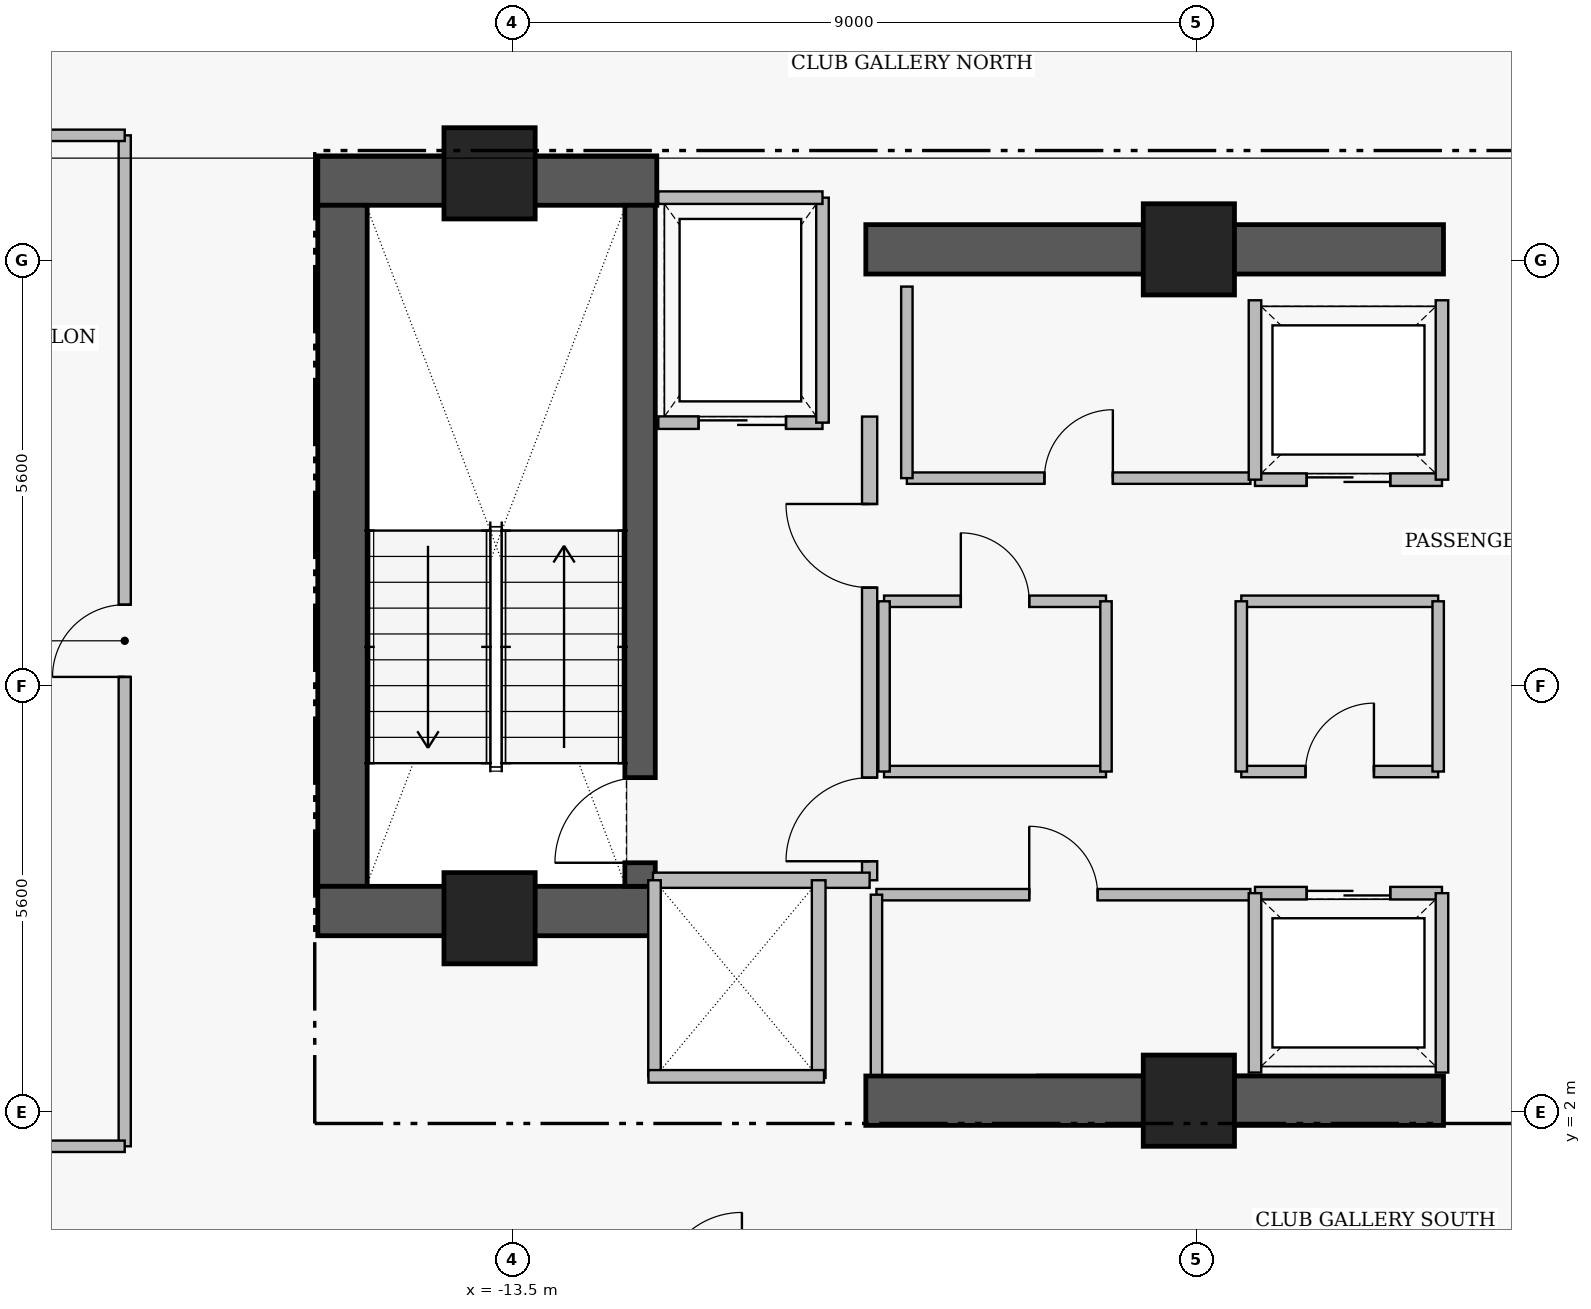
"""IFC4 building model, lengths in metres.
Left out: names, types, materials, properties, quantities, classifications, styles, units other than length and angle.
Written with IfcOpenShell. Run it as: python <this file> out.ifc"""

import sys

from ifc_helpers import new_model, si_unit, direction, frame, frame_2d, origin, origin_2d, place, context, subcontext, project, spatial, rectangle, extrude, element, fill, save


model = new_model("IFC4")
c1 = context("Model", 3, precision=1e-05, world=origin(), true_north=direction((0.0, 1.0)))
c2 = subcontext(c1, "Body", "Model", "MODEL_VIEW")
j1 = project(units=[si_unit("LENGTHUNIT", "METRE"), si_unit("PLANEANGLEUNIT", "RADIAN")], contexts=[c1])
p1 = place(None, origin())
s1 = spatial("IfcSite", under=j1, at=p1, CompositionType="ELEMENT")
p2 = place(p1, origin())
s2 = spatial("IfcBuilding", under=s1, at=p2, CompositionType="ELEMENT")
p3 = place(p2, frame((0.0, 0.0, 211.15)))
s3 = spatial("IfcBuildingStorey", under=s2, at=p3, CompositionType="ELEMENT", Elevation=211.15)
p4 = place(p3, frame((-16.06, 14.255, 0.0), z_axis=(0.0, 0.0, 1.0), x_axis=(1.0, 0.0, 0.0)))
e1 = element("IfcWall", 1, at=p4, inside=s3, PredefinedType="SHEAR", context=c2, shape_type="SweptSolid", body=[
    extrude(rectangle(XDim=4.46, YDim=0.65, at=frame_2d((2.23, 0.0))), origin(), (0.0, 0.0, 1.0), 3.56),
])
p5 = place(p3, frame((-15.735, 4.97, 0.0), z_axis=(0.0, 0.0, 1.0), x_axis=(0.0, 1.0, 0.0)))
e2 = element("IfcWall", 2, at=p5, inside=s3, PredefinedType="SHEAR", context=c2, shape_type="SweptSolid", body=[
    extrude(rectangle(XDim=8.96, YDim=0.65, at=frame_2d((4.48, 0.0))), origin(), (0.0, 0.0, 1.0), 3.56),
])
p6 = place(p3, frame((-16.06, 4.645, 0.0), z_axis=(0.0, 0.0, 1.0), x_axis=(1.0, 0.0, 0.0)))
e3 = element("IfcWall", 3, at=p6, inside=s3, PredefinedType="SHEAR", context=c2, shape_type="SweptSolid", body=[
    extrude(rectangle(XDim=4.46, YDim=0.65, at=frame_2d((2.23, 0.0))), origin(), (0.0, 0.0, 1.0), 3.56),
])
for number, where, z_axis, x_axis in (
    (4, (-8.85, 2.15, 0.0), (0.0, 0.0, 1.0), (1.0, 0.0, 0.0)),
    (5, (-8.85, 13.35, 0.0), (0.0, 0.0, 1.0), (1.0, 0.0, 0.0)),
):
    element("IfcWall", number, at=place(p3, frame(where, z_axis=z_axis, x_axis=x_axis)), inside=s3, PredefinedType="SHEAR", context=c2, shape_type="SweptSolid", body=[
        extrude(rectangle(XDim=7.6, YDim=0.65, at=frame_2d((3.8, 0.0))), origin(), (0.0, 0.0, 1.0), 3.53),
    ])
p7 = place(p3, frame((-11.82, 4.97, 0.0), z_axis=(0.0, 0.0, 1.0), x_axis=(0.0, 1.0, 0.0)))
e6 = element("IfcWall", 6, at=p7, inside=s3, PredefinedType="SHEAR", context=c2, shape_type="SweptSolid", body=[
    extrude(rectangle(XDim=8.96, YDim=0.4, at=frame_2d((4.48, 0.0))), origin(), (0.0, 0.0, 1.0), 3.56),
])
p8 = place(p7, frame((0.31, 0.0, 0.0)))
e7 = element("IfcOpeningElement", 7, at=p8, cuts=e6, PredefinedType="OPENING", context=c2, shape_type="SweptSolid", body=[
    extrude(rectangle(XDim=1.12, YDim=2.22, at=frame_2d((0.56, 1.11))), frame((0.0, 0.21, 0.0), z_axis=(0.0, -1.0, 0.0), x_axis=(1.0, 0.0, 0.0)), (0.0, 0.0, 1.0), 0.42),
])
for number, where, z_axis, x_axis in (
    (8, (-13.8, 14.35, 0.0), (0.0, 0.0, 1.0), (1.0, 0.0, 0.0)),
    (9, (-4.6, 13.35, 0.0), (0.0, 0.0, 1.0), (1.0, 0.0, 0.0)),
    (10, (-13.8, 4.55, 0.0), (0.0, 0.0, 1.0), (1.0, 0.0, 0.0)),
    (11, (-4.6, 2.15, 0.0), (0.0, 0.0, 1.0), (1.0, 0.0, 0.0)),
):
    element("IfcColumn", number, at=place(p3, frame(where, z_axis=z_axis, x_axis=x_axis)), inside=s3, PredefinedType="COLUMN", context=c2, shape_type="SweptSolid", body=[
        extrude(rectangle(XDim=1.2, YDim=1.2, at=origin_2d()), origin(), (0.0, 0.0, 1.0), 3.75),
    ])
p9 = place(p3, frame((-8.8, 5.05, 0.0), z_axis=(0.0, 0.0, 1.0), x_axis=(0.0, 1.0, 0.0)))
e12 = element("IfcWall", 12, at=p9, inside=s3, PredefinedType="PARTITIONING", context=c2, shape_type="SweptSolid", body=[
    extrude(rectangle(XDim=6.1, YDim=0.2, at=frame_2d((3.05, 0.0))), origin(), (0.0, 0.0, 1.0), 3.53),
])
p10 = place(p9, frame((0.25, 0.0, 0.0)))
e13 = element("IfcOpeningElement", 13, at=p10, cuts=e12, PredefinedType="OPENING", context=c2, shape_type="SweptSolid", body=[
    extrude(rectangle(XDim=1.1, YDim=2.2, at=frame_2d((0.55, 1.1))), frame((0.0, 0.11, 0.0), z_axis=(0.0, -1.0, 0.0), x_axis=(1.0, 0.0, 0.0)), (0.0, 0.0, 1.0), 0.22),
])
p11 = place(p9, frame((3.85, 0.0, 0.0)))
e14 = element("IfcOpeningElement", 14, at=p11, cuts=e12, PredefinedType="OPENING", context=c2, shape_type="SweptSolid", body=[
    extrude(rectangle(XDim=1.1, YDim=2.2, at=frame_2d((0.55, 1.1))), frame((0.0, 0.11, 0.0), z_axis=(0.0, -1.0, 0.0), x_axis=(1.0, 0.0, 0.0)), (0.0, 0.0, 1.0), 0.22),
])
p12 = place(p3, frame((-11.58, 11.07, 0.0), z_axis=(0.0, 0.0, 1.0), x_axis=(1.0, 0.0, 0.0)))
e15 = element("IfcWall", 15, at=p12, inside=s3, PredefinedType="PARTITIONING", context=c2, shape_type="SweptSolid", body=[
    extrude(rectangle(XDim=2.16, YDim=0.165, at=frame_2d((1.08, 0.0))), origin(), (0.0, 0.0, 1.0), 3.53),
])
p13 = place(p12, frame((0.53, 0.0, 0.0)))
e16 = element("IfcOpeningElement", 16, at=p13, cuts=e15, PredefinedType="OPENING", context=c2, shape_type="SweptSolid", body=[
    extrude(rectangle(XDim=1.15, YDim=2.25, at=frame_2d((0.575, 1.125))), frame((0.0, 0.093, 0.0), z_axis=(0.0, -1.0, 0.0), x_axis=(1.0, 0.0, 0.0)), (0.0, 0.0, 1.0), 0.185),
])
p14 = place(p3, frame((-3.73, 4.88, 0.0), z_axis=(0.0, 0.0, 1.0), x_axis=(1.0, 0.0, 0.0)))
e17 = element("IfcWall", 17, at=p14, inside=s3, PredefinedType="PARTITIONING", context=c2, shape_type="SweptSolid", body=[
    extrude(rectangle(XDim=2.46, YDim=0.165, at=frame_2d((1.23, 0.0))), origin(), (0.0, 0.0, 1.0), 3.53),
])
p15 = place(p14, frame((0.68, 0.0, 0.0)))
e18 = element("IfcOpeningElement", 18, at=p15, cuts=e17, PredefinedType="OPENING", context=c2, shape_type="SweptSolid", body=[
    extrude(rectangle(XDim=1.1, YDim=2.25, at=frame_2d((0.55, 1.125))), frame((0.0, 0.093, 0.0), z_axis=(0.0, -1.0, 0.0), x_axis=(1.0, 0.0, 0.0)), (0.0, 0.0, 1.0), 0.185),
])
p16 = place(p3, frame((-3.73, 10.32, 0.0), z_axis=(0.0, 0.0, 1.0), x_axis=(1.0, 0.0, 0.0)))
e19 = element("IfcWall", 19, at=p16, inside=s3, PredefinedType="PARTITIONING", context=c2, shape_type="SweptSolid", body=[
    extrude(rectangle(XDim=2.46, YDim=0.165, at=frame_2d((1.23, 0.0))), origin(), (0.0, 0.0, 1.0), 3.53),
])
p17 = place(p16, frame((0.68, 0.0, 0.0)))
e20 = element("IfcOpeningElement", 20, at=p17, cuts=e19, PredefinedType="OPENING", context=c2, shape_type="SweptSolid", body=[
    extrude(rectangle(XDim=1.1, YDim=2.25, at=frame_2d((0.55, 1.125))), frame((0.0, 0.093, 0.0), z_axis=(0.0, -1.0, 0.0), x_axis=(1.0, 0.0, 0.0)), (0.0, 0.0, 1.0), 0.185),
])
p18 = place(p3, frame((-8.71, 4.86, 0.0), z_axis=(0.0, 0.0, 1.0), x_axis=(1.0, 0.0, 0.0)))
e21 = element("IfcWall", 21, at=p18, inside=s3, PredefinedType="PARTITIONING", context=c2, shape_type="SweptSolid", body=[
    extrude(rectangle(XDim=4.92, YDim=0.15, at=frame_2d((2.46, 0.0))), origin(), (0.0, 0.0, 1.0), 3.53),
])
p19 = place(p18, frame((2.01, 0.0, 0.0)))
e22 = element("IfcOpeningElement", 22, at=p19, cuts=e21, PredefinedType="OPENING", context=c2, shape_type="SweptSolid", body=[
    extrude(rectangle(XDim=0.9, YDim=2.15, at=frame_2d((0.45, 1.075))), frame((0.0, 0.085, 0.0), z_axis=(0.0, -1.0, 0.0), x_axis=(1.0, 0.0, 0.0)), (0.0, 0.0, 1.0), 0.17),
])
p20 = place(p3, frame((-8.31, 10.34, 0.0), z_axis=(0.0, 0.0, 1.0), x_axis=(1.0, 0.0, 0.0)))
e23 = element("IfcWall", 23, at=p20, inside=s3, PredefinedType="PARTITIONING", context=c2, shape_type="SweptSolid", body=[
    extrude(rectangle(XDim=4.52, YDim=0.15, at=frame_2d((2.26, 0.0))), origin(), (0.0, 0.0, 1.0), 3.53),
])
p21 = place(p20, frame((1.81, 0.0, 0.0)))
e24 = element("IfcOpeningElement", 24, at=p21, cuts=e23, PredefinedType="OPENING", context=c2, shape_type="SweptSolid", body=[
    extrude(rectangle(XDim=0.9, YDim=2.15, at=frame_2d((0.45, 1.075))), frame((0.0, 0.085, 0.0), z_axis=(0.0, -1.0, 0.0), x_axis=(1.0, 0.0, 0.0)), (0.0, 0.0, 1.0), 0.17),
])
p22 = place(p3, frame((-8.61, 8.72, 0.0), z_axis=(0.0, 0.0, 1.0), x_axis=(1.0, 0.0, 0.0)))
e25 = element("IfcWall", 25, at=p22, inside=s3, PredefinedType="PARTITIONING", context=c2, shape_type="SweptSolid", body=[
    extrude(rectangle(XDim=2.92, YDim=0.15, at=frame_2d((1.46, 0.0))), origin(), (0.0, 0.0, 1.0), 3.53),
])
p23 = place(p22, frame((1.01, 0.0, 0.0)))
e26 = element("IfcOpeningElement", 26, at=p23, cuts=e25, PredefinedType="OPENING", context=c2, shape_type="SweptSolid", body=[
    extrude(rectangle(XDim=0.9, YDim=2.15, at=frame_2d((0.45, 1.075))), frame((0.0, 0.085, 0.0), z_axis=(0.0, -1.0, 0.0), x_axis=(1.0, 0.0, 0.0)), (0.0, 0.0, 1.0), 0.17),
])
p24 = place(p3, frame((-3.91, 6.48, 0.0), z_axis=(0.0, 0.0, 1.0), x_axis=(1.0, 0.0, 0.0)))
e27 = element("IfcWall", 27, at=p24, inside=s3, PredefinedType="PARTITIONING", context=c2, shape_type="SweptSolid", body=[
    extrude(rectangle(XDim=2.59, YDim=0.15, at=frame_2d((1.295, 0.0))), origin(), (0.0, 0.0, 1.0), 3.53),
])
p25 = place(p24, frame((0.845, 0.0, 0.0)))
e28 = element("IfcOpeningElement", 28, at=p25, cuts=e27, PredefinedType="OPENING", context=c2, shape_type="SweptSolid", body=[
    extrude(rectangle(XDim=0.9, YDim=2.15, at=frame_2d((0.45, 1.075))), frame((0.0, 0.085, 0.0), z_axis=(0.0, -1.0, 0.0), x_axis=(1.0, 0.0, 0.0)), (0.0, 0.0, 1.0), 0.17),
])
p26 = place(p3, frame((-18.6, 1.55, 0.0), z_axis=(0.0, 0.0, 1.0), x_axis=(0.0, 1.0, 0.0)))
e29 = element("IfcWall", 29, at=p26, inside=s3, PredefinedType="PARTITIONING", context=c2, shape_type="SweptSolid", body=[
    extrude(rectangle(XDim=13.3, YDim=0.16, at=frame_2d((6.65, 0.0))), origin(), (0.0, 0.0, 1.0), 3.53),
])
p27 = place(p26, frame((6.175, 0.0, 0.0)))
e30 = element("IfcOpeningElement", 30, at=p27, cuts=e29, PredefinedType="OPENING", context=c2, shape_type="SweptSolid", body=[
    extrude(rectangle(XDim=0.95, YDim=2.15, at=frame_2d((0.475, 1.075))), frame((0.0, 0.09, 0.0), z_axis=(0.0, -1.0, 0.0), x_axis=(1.0, 0.0, 0.0)), (0.0, 0.0, 1.0), 0.18),
])
p28 = place(p3, frame((-11.65, 5.05, 0.0), z_axis=(0.0, 0.0, 1.0), x_axis=(1.0, 0.0, 0.0)))
e31 = element("IfcWall", 31, at=p28, inside=s3, PredefinedType="PARTITIONING", context=c2, shape_type="SweptSolid", body=[
    extrude(rectangle(XDim=2.85, YDim=0.2, at=frame_2d((1.425, 0.0))), origin(), (0.0, 0.0, 1.0), 3.53),
])
p29 = place(p3, frame((-9.42, 11.07, 0.0), z_axis=(0.0, 0.0, 1.0), x_axis=(0.0, 1.0, 0.0)))
e32 = element("IfcWall", 32, at=p29, inside=s3, PredefinedType="PARTITIONING", context=c2, shape_type="SweptSolid", body=[
    extrude(rectangle(XDim=2.96, YDim=0.165, at=frame_2d((1.48, 0.0))), origin(), (0.0, 0.0, 1.0), 3.53),
])
p30 = place(p3, frame((-11.58, 14.03, 0.0), z_axis=(0.0, 0.0, 1.0), x_axis=(1.0, 0.0, 0.0)))
e33 = element("IfcWall", 33, at=p30, inside=s3, PredefinedType="PARTITIONING", context=c2, shape_type="SweptSolid", body=[
    extrude(rectangle(XDim=2.16, YDim=0.165, at=frame_2d((1.08, 0.0))), origin(), (0.0, 0.0, 1.0), 3.53),
])
for number, where, z_axis, x_axis in (
    (34, (-3.73, 2.52, 0.0), (0.0, 0.0, 1.0), (0.0, 1.0, 0.0)),
    (35, (-1.27, 2.52, 0.0), (0.0, 0.0, 1.0), (0.0, 1.0, 0.0)),
    (36, (-3.73, 10.32, 0.0), (0.0, 0.0, 1.0), (0.0, 1.0, 0.0)),
    (37, (-1.27, 10.32, 0.0), (0.0, 0.0, 1.0), (0.0, 1.0, 0.0)),
):
    element("IfcWall", number, at=place(p3, frame(where, z_axis=z_axis, x_axis=x_axis)), inside=s3, PredefinedType="PARTITIONING", context=c2, shape_type="SweptSolid", body=[
        extrude(rectangle(XDim=2.36, YDim=0.165, at=frame_2d((1.18, 0.0))), origin(), (0.0, 0.0, 1.0), 3.53),
    ])
p31 = place(p3, frame((-8.71, 2.49, 0.0), z_axis=(0.0, 0.0, 1.0), x_axis=(0.0, 1.0, 0.0)))
e38 = element("IfcWall", 38, at=p31, inside=s3, PredefinedType="PARTITIONING", context=c2, shape_type="SweptSolid", body=[
    extrude(rectangle(XDim=2.37, YDim=0.15, at=frame_2d((1.185, 0.0))), origin(), (0.0, 0.0, 1.0), 3.53),
])
p32 = place(p3, frame((-8.31, 10.34, 0.0), z_axis=(0.0, 0.0, 1.0), x_axis=(0.0, 1.0, 0.0)))
e39 = element("IfcWall", 39, at=p32, inside=s3, PredefinedType="PARTITIONING", context=c2, shape_type="SweptSolid", body=[
    extrude(rectangle(XDim=2.52, YDim=0.15, at=frame_2d((1.26, 0.0))), origin(), (0.0, 0.0, 1.0), 3.53),
])
p33 = place(p3, frame((-9.47, 2.45, 0.0), z_axis=(0.0, 0.0, 1.0), x_axis=(0.0, 1.0, 0.0)))
e40 = element("IfcWall", 40, at=p33, inside=s3, PredefinedType="PARTITIONING", context=c2, shape_type="SweptSolid", body=[
    extrude(rectangle(XDim=2.6, YDim=0.18, at=frame_2d((1.3, 0.0))), origin(), (0.0, 0.0, 1.0), 3.53),
])
p34 = place(p3, frame((-11.63, 2.47, 0.0), z_axis=(0.0, 0.0, 1.0), x_axis=(0.0, 1.0, 0.0)))
e41 = element("IfcWall", 41, at=p34, inside=s3, PredefinedType="PARTITIONING", context=c2, shape_type="SweptSolid", body=[
    extrude(rectangle(XDim=2.58, YDim=0.165, at=frame_2d((1.29, 0.0))), origin(), (0.0, 0.0, 1.0), 3.53),
])
p35 = place(p3, frame((-11.71, 2.47, 0.0), z_axis=(0.0, 0.0, 1.0), x_axis=(1.0, 0.0, 0.0)))
e42 = element("IfcWall", 42, at=p35, inside=s3, PredefinedType="PARTITIONING", context=c2, shape_type="SweptSolid", body=[
    extrude(rectangle(XDim=2.31, YDim=0.165, at=frame_2d((1.155, 0.0))), origin(), (0.0, 0.0, 1.0), 2.43),
])
p36 = place(p3, frame((-8.61, 6.48, 0.0), z_axis=(0.0, 0.0, 1.0), x_axis=(1.0, 0.0, 0.0)))
e43 = element("IfcWall", 43, at=p36, inside=s3, PredefinedType="PARTITIONING", context=c2, shape_type="SweptSolid", body=[
    extrude(rectangle(XDim=2.92, YDim=0.15, at=frame_2d((1.46, 0.0))), origin(), (0.0, 0.0, 1.0), 3.53),
])
for number, where, z_axis, x_axis in (
    (44, (-8.61, 6.48, 0.0), (0.0, 0.0, 1.0), (0.0, 1.0, 0.0)),
    (45, (-5.69, 6.48, 0.0), (0.0, 0.0, 1.0), (0.0, 1.0, 0.0)),
):
    element("IfcWall", number, at=place(p3, frame(where, z_axis=z_axis, x_axis=x_axis)), inside=s3, PredefinedType="PARTITIONING", context=c2, shape_type="SweptSolid", body=[
        extrude(rectangle(XDim=2.24, YDim=0.15, at=frame_2d((1.12, 0.0))), origin(), (0.0, 0.0, 1.0), 3.53),
    ])
p37 = place(p3, frame((-3.91, 8.72, 0.0), z_axis=(0.0, 0.0, 1.0), x_axis=(1.0, 0.0, 0.0)))
e46 = element("IfcWall", 46, at=p37, inside=s3, PredefinedType="PARTITIONING", context=c2, shape_type="SweptSolid", body=[
    extrude(rectangle(XDim=2.59, YDim=0.15, at=frame_2d((1.295, 0.0))), origin(), (0.0, 0.0, 1.0), 3.53),
])
for number, where, z_axis, x_axis in (
    (47, (-3.91, 6.48, 0.0), (0.0, 0.0, 1.0), (0.0, 1.0, 0.0)),
    (48, (-1.32, 6.48, 0.0), (0.0, 0.0, 1.0), (0.0, 1.0, 0.0)),
):
    element("IfcWall", number, at=place(p3, frame(where, z_axis=z_axis, x_axis=x_axis)), inside=s3, PredefinedType="PARTITIONING", context=c2, shape_type="SweptSolid", body=[
        extrude(rectangle(XDim=2.24, YDim=0.15, at=frame_2d((1.12, 0.0))), origin(), (0.0, 0.0, 1.0), 3.53),
    ])
p38 = place(p3, frame((-22.04, 1.55, 0.0), z_axis=(0.0, 0.0, 1.0), x_axis=(1.0, 0.0, 0.0)))
e49 = element("IfcWall", 49, at=p38, inside=s3, PredefinedType="PARTITIONING", context=c2, shape_type="SweptSolid", body=[
    extrude(rectangle(XDim=3.44, YDim=0.15, at=frame_2d((1.72, 0.0))), origin(), (0.0, 0.0, 1.0), 3.53),
])
p39 = place(p3, frame((-23.638, 14.85, 0.0), z_axis=(0.0, 0.0, 1.0), x_axis=(1.0, 0.0, 0.0)))
e50 = element("IfcWall", 50, at=p39, inside=s3, PredefinedType="PARTITIONING", context=c2, shape_type="SweptSolid", body=[
    extrude(rectangle(XDim=5.038, YDim=0.15, at=frame_2d((2.519, 0.0))), origin(), (0.0, 0.0, 1.0), 3.53),
])
p40 = place(p8, origin())
e51 = element("IfcDoor", 51, at=p40, inside=s3, OperationType="SINGLE_SWING_LEFT", PredefinedType="DOOR", context=c2, shape_type="SweptSolid", body=[
    extrude(rectangle(XDim=1.12, YDim=2.22, at=frame_2d((0.56, 1.11))), frame((0.0, 0.025, 0.0), z_axis=(0.0, -1.0, 0.0), x_axis=(1.0, 0.0, 0.0)), (0.0, 0.0, 1.0), 0.05),
])
fill(e7, e51)
p41 = place(p10, origin())
e52 = element("IfcDoor", 52, at=p41, inside=s3, OperationType="SINGLE_SWING_LEFT", PredefinedType="DOOR", context=c2, shape_type="SweptSolid", body=[
    extrude(rectangle(XDim=1.1, YDim=2.2, at=frame_2d((0.55, 1.1))), frame((0.0, 0.025, 0.0), z_axis=(0.0, -1.0, 0.0), x_axis=(1.0, 0.0, 0.0)), (0.0, 0.0, 1.0), 0.05),
])
fill(e13, e52)
p42 = place(p11, origin())
e53 = element("IfcDoor", 53, at=p42, inside=s3, OperationType="SINGLE_SWING_RIGHT", PredefinedType="DOOR", context=c2, shape_type="SweptSolid", body=[
    extrude(rectangle(XDim=1.1, YDim=2.2, at=frame_2d((0.55, 1.1))), frame((0.0, 0.025, 0.0), z_axis=(0.0, -1.0, 0.0), x_axis=(1.0, 0.0, 0.0)), (0.0, 0.0, 1.0), 0.05),
])
fill(e14, e53)
p43 = place(p13, origin())
e54 = element("IfcDoor", 54, at=p43, inside=s3, OperationType="SLIDING_TO_LEFT", PredefinedType="DOOR", context=c2, shape_type="SweptSolid", body=[
    extrude(rectangle(XDim=1.15, YDim=2.25, at=frame_2d((0.575, 1.125))), frame((0.0, 0.025, 0.0), z_axis=(0.0, -1.0, 0.0), x_axis=(1.0, 0.0, 0.0)), (0.0, 0.0, 1.0), 0.05),
])
fill(e16, e54)
p44 = place(p15, origin())
e55 = element("IfcDoor", 55, at=p44, inside=s3, OperationType="SLIDING_TO_LEFT", PredefinedType="DOOR", context=c2, shape_type="SweptSolid", body=[
    extrude(rectangle(XDim=1.1, YDim=2.25, at=frame_2d((0.55, 1.125))), frame((0.0, 0.025, 0.0), z_axis=(0.0, -1.0, 0.0), x_axis=(1.0, 0.0, 0.0)), (0.0, 0.0, 1.0), 0.05),
])
fill(e18, e55)
p45 = place(p17, origin())
e56 = element("IfcDoor", 56, at=p45, inside=s3, OperationType="SLIDING_TO_LEFT", PredefinedType="DOOR", context=c2, shape_type="SweptSolid", body=[
    extrude(rectangle(XDim=1.1, YDim=2.25, at=frame_2d((0.55, 1.125))), frame((0.0, 0.025, 0.0), z_axis=(0.0, -1.0, 0.0), x_axis=(1.0, 0.0, 0.0)), (0.0, 0.0, 1.0), 0.05),
])
fill(e20, e56)
p46 = place(p19, origin())
e57 = element("IfcDoor", 57, at=p46, inside=s3, OperationType="SINGLE_SWING_LEFT", PredefinedType="DOOR", context=c2, shape_type="SweptSolid", body=[
    extrude(rectangle(XDim=0.9, YDim=2.15, at=frame_2d((0.45, 1.075))), frame((0.0, 0.025, 0.0), z_axis=(0.0, -1.0, 0.0), x_axis=(1.0, 0.0, 0.0)), (0.0, 0.0, 1.0), 0.05),
])
fill(e22, e57)
p47 = place(p21, origin())
e58 = element("IfcDoor", 58, at=p47, inside=s3, OperationType="SINGLE_SWING_RIGHT", PredefinedType="DOOR", context=c2, shape_type="SweptSolid", body=[
    extrude(rectangle(XDim=0.9, YDim=2.15, at=frame_2d((0.45, 1.075))), frame((0.0, 0.025, 0.0), z_axis=(0.0, -1.0, 0.0), x_axis=(1.0, 0.0, 0.0)), (0.0, 0.0, 1.0), 0.05),
])
fill(e24, e58)
p48 = place(p23, origin())
e59 = element("IfcDoor", 59, at=p48, inside=s3, OperationType="SINGLE_SWING_LEFT", PredefinedType="DOOR", context=c2, shape_type="SweptSolid", body=[
    extrude(rectangle(XDim=0.9, YDim=2.15, at=frame_2d((0.45, 1.075))), frame((0.0, 0.025, 0.0), z_axis=(0.0, -1.0, 0.0), x_axis=(1.0, 0.0, 0.0)), (0.0, 0.0, 1.0), 0.05),
])
fill(e26, e59)
p49 = place(p25, origin())
e60 = element("IfcDoor", 60, at=p49, inside=s3, OperationType="SINGLE_SWING_RIGHT", PredefinedType="DOOR", context=c2, shape_type="SweptSolid", body=[
    extrude(rectangle(XDim=0.9, YDim=2.15, at=frame_2d((0.45, 1.075))), frame((0.0, 0.025, 0.0), z_axis=(0.0, -1.0, 0.0), x_axis=(1.0, 0.0, 0.0)), (0.0, 0.0, 1.0), 0.05),
])
fill(e28, e60)
p50 = place(p27, origin())
e61 = element("IfcDoor", 61, at=p50, inside=s3, OperationType="SINGLE_SWING_LEFT", PredefinedType="DOOR", context=c2, shape_type="SweptSolid", body=[
    extrude(rectangle(XDim=0.95, YDim=2.15, at=frame_2d((0.475, 1.075))), frame((0.0, 0.025, 0.0), z_axis=(0.0, -1.0, 0.0), x_axis=(1.0, 0.0, 0.0)), (0.0, 0.0, 1.0), 0.05),
])
fill(e30, e61)
save(model, sys.argv[1])
